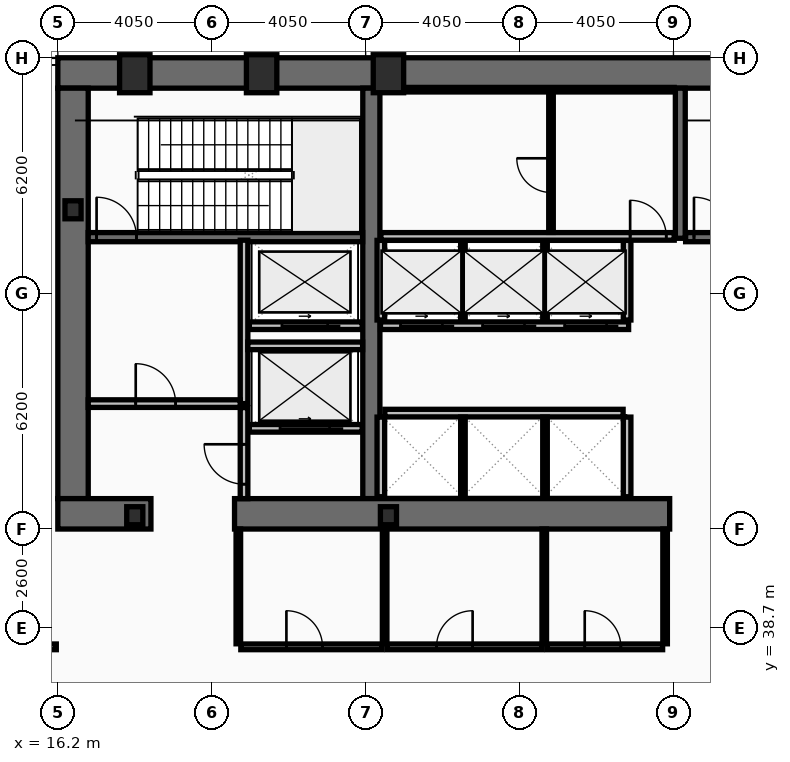
"""IFC4 building model, lengths in metres.
Left out: names, types, materials, properties, quantities, classifications, styles, units other than length and angle.
Written with IfcOpenShell. Run it as: python <this file> out.ifc"""

import sys

from ifc_helpers import new_model, si_unit, direction, frame, frame_2d, origin, origin_2d, place, context, subcontext, project, spatial, rectangle, hollow_rectangle, i_section, extrude, element, fill, save


model = new_model("IFC4")
c1 = context("Model", 3, precision=1e-05, world=origin(), true_north=direction((0.0, 1.0)))
c2 = subcontext(c1, "Body", "Model", "MODEL_VIEW")
j1 = project(units=[si_unit("LENGTHUNIT", "METRE"), si_unit("PLANEANGLEUNIT", "RADIAN")], contexts=[c1])
p1 = place(None, origin())
s1 = spatial("IfcSite", under=j1, at=p1, CompositionType="ELEMENT")
p2 = place(p1, origin())
s2 = spatial("IfcBuilding", under=s1, at=p2, CompositionType="ELEMENT")
p3 = place(p2, frame((0.0, 0.0, 5.4)))
s3 = spatial("IfcBuildingStorey", under=s2, at=p3, CompositionType="ELEMENT", Elevation=5.4)
p4 = place(p3, frame((16.2, 53.3, 0.0), z_axis=(0.0, 0.0, 1.0), x_axis=(1.0, 0.0, 0.0)))
e1 = element("IfcWall", 1, at=p4, inside=s3, PredefinedType="SHEAR", context=c2, shape_type="SweptSolid", body=[
    extrude(rectangle(XDim=40.5, YDim=0.8, at=frame_2d((20.25, 0.0))), origin(), (0.0, 0.0, 1.0), 4.8),
])
p5 = place(p3, frame((16.6, 42.1, 0.0), z_axis=(0.0, 0.0, 1.0), x_axis=(0.0, 1.0, 0.0)))
e2 = element("IfcWall", 2, at=p5, inside=s3, PredefinedType="SHEAR", context=c2, shape_type="SweptSolid", body=[
    extrude(rectangle(XDim=10.8, YDim=0.8, at=frame_2d((5.4, 0.0))), origin(), (0.0, 0.0, 1.0), 4.8),
])
p6 = place(p3, frame((24.45, 42.1, 0.0), z_axis=(0.0, 0.0, 1.0), x_axis=(0.0, 1.0, 0.0)))
e3 = element("IfcWall", 3, at=p6, inside=s3, PredefinedType="SHEAR", context=c2, shape_type="SweptSolid", body=[
    extrude(rectangle(XDim=10.8, YDim=0.45, at=frame_2d((5.4, 0.0))), origin(), (0.0, 0.0, 1.0), 4.8),
])
p7 = place(p3, frame((18.65, 41.7, 0.0), z_axis=(0.0, 0.0, 1.0), x_axis=(-1.0, 0.0, 0.0)))
e4 = element("IfcWall", 4, at=p7, inside=s3, PredefinedType="SHEAR", context=c2, shape_type="SweptSolid", body=[
    extrude(rectangle(XDim=2.45, YDim=0.8, at=frame_2d((1.225, 0.0))), origin(), (0.0, 0.0, 1.0), 4.8),
])
p8 = place(p3, frame((32.3, 41.7, 0.0), z_axis=(0.0, 0.0, 1.0), x_axis=(-1.0, 0.0, 0.0)))
e5 = element("IfcWall", 5, at=p8, inside=s3, PredefinedType="SHEAR", context=c2, shape_type="SweptSolid", body=[
    extrude(rectangle(XDim=11.45, YDim=0.8, at=frame_2d((5.725, 0.0))), origin(), (0.0, 0.0, 1.0), 4.8),
])
p9 = place(p3, frame((32.58, 48.95, 0.0), z_axis=(0.0, 0.0, 1.0), x_axis=(0.0, 1.0, 0.0)))
e6 = element("IfcWall", 6, at=p9, inside=s3, PredefinedType="SHEAR", context=c2, shape_type="SweptSolid", body=[
    extrude(rectangle(XDim=3.95, YDim=0.26, at=frame_2d((1.975, 0.0))), origin(), (0.0, 0.0, 1.0), 4.8),
])
p10 = place(p3, frame((17.0, 48.98, 0.0), z_axis=(0.0, 0.0, 1.0), x_axis=(1.0, 0.0, 0.0)))
e7 = element("IfcWall", 7, at=p10, inside=s3, PredefinedType="SHEAR", context=c2, shape_type="SweptSolid", body=[
    extrude(rectangle(XDim=7.22, YDim=0.24, at=frame_2d((3.61, 0.0))), origin(), (0.0, 0.0, 1.0), 4.8),
])
p11 = place(p10, frame((0.22, 0.0, 0.0)))
e8 = element("IfcOpeningElement", 8, at=p11, cuts=e7, PredefinedType="OPENING", context=c2, shape_type="SweptSolid", body=[
    extrude(rectangle(XDim=1.05, YDim=2.15, at=frame_2d((0.525, 1.075))), frame((0.0, 0.13, 0.0), z_axis=(0.0, -1.0, 0.0), x_axis=(1.0, 0.0, 0.0)), (0.0, 0.0, 1.0), 0.26),
])
p12 = place(p3, frame((32.72, 48.98, 0.0), z_axis=(0.0, 0.0, 1.0), x_axis=(1.0, 0.0, 0.0)))
e9 = element("IfcWall", 9, at=p12, inside=s3, PredefinedType="SHEAR", context=c2, shape_type="SweptSolid", body=[
    extrude(rectangle(XDim=7.56, YDim=0.24, at=frame_2d((3.78, 0.0))), origin(), (0.0, 0.0, 1.0), 4.8),
])
p13 = place(p12, frame((0.22, 0.0, 0.0)))
e10 = element("IfcOpeningElement", 10, at=p13, cuts=e9, PredefinedType="OPENING", context=c2, shape_type="SweptSolid", body=[
    extrude(rectangle(XDim=1.05, YDim=2.15, at=frame_2d((0.525, 1.075))), frame((0.0, 0.13, 0.0), z_axis=(0.0, -1.0, 0.0), x_axis=(1.0, 0.0, 0.0)), (0.0, 0.0, 1.0), 0.26),
])
for number, where, z_axis, x_axis in (
    (11, (18.225, 53.28, 0.0), (0.0, 0.0, 1.0), (1.0, 0.0, 0.0)),
    (12, (21.562, 53.28, 0.0), (0.0, 0.0, 1.0), (1.0, 0.0, 0.0)),
    (13, (24.9, 53.28, 0.0), (0.0, 0.0, 1.0), (1.0, 0.0, 0.0)),
):
    element("IfcColumn", number, at=place(p3, frame(where, z_axis=z_axis, x_axis=x_axis)), inside=s3, PredefinedType="COLUMN", context=c2, shape_type="SweptSolid", body=[
        extrude(hollow_rectangle(XDim=0.8, YDim=1.0, WallThickness=0.055, at=origin_2d()), origin(), (0.0, 0.0, 1.0), 5.0),
    ])
for number, where, z_axis, x_axis in (
    (14, (16.6, 49.7, 0.0), (0.0, 0.0, 1.0), (1.0, 0.0, 0.0)),
    (15, (18.225, 41.65, 0.0), (0.0, 0.0, 1.0), (1.0, 0.0, 0.0)),
    (16, (24.9, 41.65, 0.0), (0.0, 0.0, 1.0), (1.0, 0.0, 0.0)),
):
    element("IfcColumn", number, at=place(p3, frame(where, z_axis=z_axis, x_axis=x_axis)), inside=s3, PredefinedType="COLUMN", context=c2, shape_type="SweptSolid", body=[
        extrude(i_section(OverallWidth=0.424, OverallDepth=0.474, WebThickness=0.048, FlangeThickness=0.077, at=origin_2d()), origin(), (0.0, 0.0, 1.0), 5.0),
    ])
p14 = place(p3, frame((24.21, 43.95, 0.0), z_axis=(0.0, 0.0, 1.0), x_axis=(-1.0, 0.0, 0.0)))
e17 = element("IfcWall", 17, at=p14, inside=s3, PredefinedType="PARTITIONING", context=c2, shape_type="SweptSolid", body=[
    extrude(rectangle(XDim=2.97, YDim=0.2, at=frame_2d((1.485, 0.0))), origin(), (0.0, 0.0, 1.0), 4.8),
])
p15 = place(p14, frame((0.86, 0.0, 0.0)))
e18 = element("IfcOpeningElement", 18, at=p15, cuts=e17, PredefinedType="OPENING", context=c2, shape_type="SweptSolid", body=[
    extrude(rectangle(XDim=1.3, YDim=2.18, at=frame_2d((0.65, 1.09))), frame((0.0, 0.11, 0.0), z_axis=(0.0, -1.0, 0.0), x_axis=(1.0, 0.0, 0.0)), (0.0, 0.0, 1.0), 0.22),
])
p16 = place(p3, frame((24.21, 46.65, 0.0), z_axis=(0.0, 0.0, 1.0), x_axis=(-1.0, 0.0, 0.0)))
e19 = element("IfcWall", 19, at=p16, inside=s3, PredefinedType="PARTITIONING", context=c2, shape_type="SweptSolid", body=[
    extrude(rectangle(XDim=2.97, YDim=0.2, at=frame_2d((1.485, 0.0))), origin(), (0.0, 0.0, 1.0), 4.8),
])
p17 = place(p16, frame((0.91, 0.0, 0.0)))
e20 = element("IfcOpeningElement", 20, at=p17, cuts=e19, PredefinedType="OPENING", context=c2, shape_type="SweptSolid", body=[
    extrude(rectangle(XDim=1.2, YDim=2.18, at=frame_2d((0.6, 1.09))), frame((0.0, 0.11, 0.0), z_axis=(0.0, -1.0, 0.0), x_axis=(1.0, 0.0, 0.0)), (0.0, 0.0, 1.0), 0.22),
])
p18 = place(p3, frame((31.22, 46.65, 0.0), z_axis=(0.0, 0.0, 1.0), x_axis=(-1.0, 0.0, 0.0)))
e21 = element("IfcWall", 21, at=p18, inside=s3, PredefinedType="PARTITIONING", context=c2, shape_type="SweptSolid", body=[
    extrude(rectangle(XDim=6.53, YDim=0.2, at=frame_2d((3.265, 0.0))), origin(), (0.0, 0.0, 1.0), 4.8),
])
p19 = place(p18, frame((4.9, 0.0, 0.0)))
e22 = element("IfcOpeningElement", 22, at=p19, cuts=e21, PredefinedType="OPENING", context=c2, shape_type="SweptSolid", body=[
    extrude(rectangle(XDim=1.1, YDim=2.18, at=frame_2d((0.55, 1.09))), frame((0.0, 0.11, 0.0), z_axis=(0.0, -1.0, 0.0), x_axis=(1.0, 0.0, 0.0)), (0.0, 0.0, 1.0), 0.22),
])
p20 = place(p18, frame((2.74, 0.0, 0.0)))
e23 = element("IfcOpeningElement", 23, at=p20, cuts=e21, PredefinedType="OPENING", context=c2, shape_type="SweptSolid", body=[
    extrude(rectangle(XDim=1.1, YDim=2.18, at=frame_2d((0.55, 1.09))), frame((0.0, 0.11, 0.0), z_axis=(0.0, -1.0, 0.0), x_axis=(1.0, 0.0, 0.0)), (0.0, 0.0, 1.0), 0.22),
])
p21 = place(p18, frame((0.58, 0.0, 0.0)))
e24 = element("IfcOpeningElement", 24, at=p21, cuts=e21, PredefinedType="OPENING", context=c2, shape_type="SweptSolid", body=[
    extrude(rectangle(XDim=1.1, YDim=2.18, at=frame_2d((0.55, 1.09))), frame((0.0, 0.11, 0.0), z_axis=(0.0, -1.0, 0.0), x_axis=(1.0, 0.0, 0.0)), (0.0, 0.0, 1.0), 0.22),
])
p22 = place(p3, frame((21.1, 44.6, 0.0), z_axis=(0.0, 0.0, 1.0), x_axis=(0.0, 1.0, 0.0)))
e25 = element("IfcWall", 25, at=p22, inside=s3, PredefinedType="PARTITIONING", context=c2, shape_type="SweptSolid", body=[
    extrude(rectangle(XDim=4.3, YDim=0.2, at=frame_2d((2.15, 0.0))), origin(), (0.0, 0.0, 1.0), 4.8),
])
p23 = place(p3, frame((17.0, 44.6, 0.0), z_axis=(0.0, 0.0, 1.0), x_axis=(1.0, 0.0, 0.0)))
e26 = element("IfcWall", 26, at=p23, inside=s3, PredefinedType="PARTITIONING", context=c2, shape_type="SweptSolid", body=[
    extrude(rectangle(XDim=4.0, YDim=0.2, at=frame_2d((2.0, 0.0))), origin(), (0.0, 0.0, 1.0), 4.8),
])
p24 = place(p23, frame((1.25, 0.0, 0.0)))
e27 = element("IfcOpeningElement", 27, at=p24, cuts=e26, PredefinedType="OPENING", context=c2, shape_type="SweptSolid", body=[
    extrude(rectangle(XDim=1.05, YDim=2.15, at=frame_2d((0.525, 1.075))), frame((0.0, 0.11, 0.0), z_axis=(0.0, -1.0, 0.0), x_axis=(1.0, 0.0, 0.0)), (0.0, 0.0, 1.0), 0.22),
])
p25 = place(p3, frame((21.2, 46.12, 0.0), z_axis=(0.0, 0.0, 1.0), x_axis=(1.0, 0.0, 0.0)))
e28 = element("IfcWall", 28, at=p25, inside=s3, PredefinedType="PARTITIONING", context=c2, shape_type="SweptSolid", body=[
    extrude(rectangle(XDim=3.02, YDim=0.2, at=frame_2d((1.51, 0.0))), origin(), (0.0, 0.0, 1.0), 4.8),
])
p26 = place(p3, frame((21.1, 42.1, 0.0), z_axis=(0.0, 0.0, 1.0), x_axis=(0.0, 1.0, 0.0)))
e29 = element("IfcWall", 29, at=p26, inside=s3, PredefinedType="PARTITIONING", context=c2, shape_type="SweptSolid", body=[
    extrude(rectangle(XDim=2.395, YDim=0.2, at=frame_2d((1.198, 0.0))), origin(), (0.0, 0.0, 1.0), 4.8),
])
p27 = place(p26, frame((0.38, 0.0, 0.0)))
e30 = element("IfcOpeningElement", 30, at=p27, cuts=e29, PredefinedType="OPENING", context=c2, shape_type="SweptSolid", body=[
    extrude(rectangle(XDim=1.05, YDim=2.15, at=frame_2d((0.525, 1.075))), frame((0.0, 0.11, 0.0), z_axis=(0.0, -1.0, 0.0), x_axis=(1.0, 0.0, 0.0)), (0.0, 0.0, 1.0), 0.22),
])
for number, where, z_axis, x_axis in (
    (31, (24.7, 46.8, 0.0), (0.0, 0.0, 1.0), (0.0, 1.0, 0.0)),
    (32, (31.18, 46.8, 0.0), (0.0, 0.0, 1.0), (0.0, 1.0, 0.0)),
):
    element("IfcWall", number, at=place(p3, frame(where, z_axis=z_axis, x_axis=x_axis)), inside=s3, PredefinedType="PARTITIONING", context=c2, shape_type="SweptSolid", body=[
        extrude(rectangle(XDim=2.095, YDim=0.2, at=frame_2d((1.047, 0.0))), origin(), (0.0, 0.0, 1.0), 4.8),
    ])
for number, where, z_axis, x_axis in (
    (33, (26.86, 46.8, 0.0), (0.0, 0.0, 1.0), (0.0, 1.0, 0.0)),
    (34, (29.02, 46.8, 0.0), (0.0, 0.0, 1.0), (0.0, 1.0, 0.0)),
):
    element("IfcWall", number, at=place(p3, frame(where, z_axis=z_axis, x_axis=x_axis)), inside=s3, PredefinedType="PARTITIONING", context=c2, shape_type="SweptSolid", body=[
        extrude(rectangle(XDim=2.095, YDim=0.12, at=frame_2d((1.047, 0.0))), origin(), (0.0, 0.0, 1.0), 4.8),
    ])
p28 = place(p3, frame((24.805, 44.35, 0.0), z_axis=(0.0, 0.0, 1.0), x_axis=(1.0, 0.0, 0.0)))
e35 = element("IfcWall", 35, at=p28, inside=s3, PredefinedType="PARTITIONING", context=c2, shape_type="SweptSolid", body=[
    extrude(rectangle(XDim=6.27, YDim=0.2, at=frame_2d((3.135, 0.0))), origin(), (0.0, 0.0, 1.0), 4.8),
])
for number, where, z_axis, x_axis in (
    (36, (24.7, 42.15, 0.0), (0.0, 0.0, 1.0), (0.0, 1.0, 0.0)),
    (37, (31.18, 42.15, 0.0), (0.0, 0.0, 1.0), (0.0, 1.0, 0.0)),
):
    element("IfcWall", number, at=place(p3, frame(where, z_axis=z_axis, x_axis=x_axis)), inside=s3, PredefinedType="PARTITIONING", context=c2, shape_type="SweptSolid", body=[
        extrude(rectangle(XDim=2.095, YDim=0.2, at=frame_2d((1.048, 0.0))), origin(), (0.0, 0.0, 1.0), 4.8),
    ])
for number, where, z_axis, x_axis in (
    (38, (26.86, 42.15, 0.0), (0.0, 0.0, 1.0), (0.0, 1.0, 0.0)),
    (39, (29.02, 42.15, 0.0), (0.0, 0.0, 1.0), (0.0, 1.0, 0.0)),
):
    element("IfcWall", number, at=place(p3, frame(where, z_axis=z_axis, x_axis=x_axis)), inside=s3, PredefinedType="PARTITIONING", context=c2, shape_type="SweptSolid", body=[
        extrude(rectangle(XDim=2.095, YDim=0.12, at=frame_2d((1.048, 0.0))), origin(), (0.0, 0.0, 1.0), 4.8),
    ])
p29 = place(p3, frame((24.7, 52.86, 0.0), z_axis=(0.0, 0.0, 1.0), x_axis=(1.0, 0.0, 0.0)))
e40 = element("IfcWall", 40, at=p29, inside=s3, PredefinedType="PARTITIONING", context=c2, shape_type="SweptSolid", body=[
    extrude(rectangle(XDim=7.72, YDim=0.12, at=frame_2d((3.86, 0.0))), origin(), (0.0, 0.0, 1.0), 4.8),
])
p30 = place(p3, frame((24.7, 49.0, 0.0), z_axis=(0.0, 0.0, 1.0), x_axis=(1.0, 0.0, 0.0)))
e41 = element("IfcWall", 41, at=p30, inside=s3, PredefinedType="PARTITIONING", context=c2, shape_type="SweptSolid", body=[
    extrude(rectangle(XDim=7.72, YDim=0.2, at=frame_2d((3.86, 0.0))), origin(), (0.0, 0.0, 1.0), 4.8),
])
p31 = place(p30, frame((6.56, 0.0, 0.0)))
e42 = element("IfcOpeningElement", 42, at=p31, cuts=e41, PredefinedType="OPENING", context=c2, shape_type="SweptSolid", body=[
    extrude(rectangle(XDim=0.95, YDim=2.1, at=frame_2d((0.475, 1.05))), frame((0.0, 0.11, 0.0), z_axis=(0.0, -1.0, 0.0), x_axis=(1.0, 0.0, 0.0)), (0.0, 0.0, 1.0), 0.22),
])
p32 = place(p3, frame((29.177, 49.105, 0.0), z_axis=(0.0, 0.0, 1.0), x_axis=(0.0, 1.0, 0.0)))
e43 = element("IfcWall", 43, at=p32, inside=s3, PredefinedType="PARTITIONING", context=c2, shape_type="SweptSolid", body=[
    extrude(rectangle(XDim=3.69, YDim=0.12, at=frame_2d((1.845, 0.0))), origin(), (0.0, 0.0, 1.0), 4.8),
])
p33 = place(p32, frame((1.05, 0.0, 0.0)))
e44 = element("IfcOpeningElement", 44, at=p33, cuts=e43, PredefinedType="OPENING", context=c2, shape_type="SweptSolid", body=[
    extrude(rectangle(XDim=0.9, YDim=2.05, at=frame_2d((0.45, 1.025))), frame((0.0, 0.07, 0.0), z_axis=(0.0, -1.0, 0.0), x_axis=(1.0, 0.0, 0.0)), (0.0, 0.0, 1.0), 0.14),
])
p34 = place(p3, frame((21.015, 38.2, 0.0), z_axis=(0.0, 0.0, 1.0), x_axis=(1.0, 0.0, 0.0)))
e45 = element("IfcWall", 45, at=p34, inside=s3, PredefinedType="PARTITIONING", context=c2, shape_type="SweptSolid", body=[
    extrude(rectangle(XDim=3.72, YDim=0.15, at=frame_2d((1.86, 0.0))), origin(), (0.0, 0.0, 1.0), 3.89),
])
p35 = place(p34, frame((1.2, 0.0, 0.0)))
e46 = element("IfcOpeningElement", 46, at=p35, cuts=e45, PredefinedType="OPENING", context=c2, shape_type="SweptSolid", body=[
    extrude(rectangle(XDim=0.95, YDim=2.05, at=frame_2d((0.475, 1.025))), frame((0.0, 0.085, 0.0), z_axis=(0.0, -1.0, 0.0), x_axis=(1.0, 0.0, 0.0)), (0.0, 0.0, 1.0), 0.17),
])
p36 = place(p3, frame((24.865, 38.2, 0.0), z_axis=(0.0, 0.0, 1.0), x_axis=(1.0, 0.0, 0.0)))
e47 = element("IfcWall", 47, at=p36, inside=s3, PredefinedType="PARTITIONING", context=c2, shape_type="SweptSolid", body=[
    extrude(rectangle(XDim=4.07, YDim=0.15, at=frame_2d((2.035, 0.0))), origin(), (0.0, 0.0, 1.0), 3.89),
])
p37 = place(p36, frame((1.3, 0.0, 0.0)))
e48 = element("IfcOpeningElement", 48, at=p37, cuts=e47, PredefinedType="OPENING", context=c2, shape_type="SweptSolid", body=[
    extrude(rectangle(XDim=0.95, YDim=2.05, at=frame_2d((0.475, 1.025))), frame((0.0, 0.085, 0.0), z_axis=(0.0, -1.0, 0.0), x_axis=(1.0, 0.0, 0.0)), (0.0, 0.0, 1.0), 0.17),
])
p38 = place(p3, frame((29.065, 38.2, 0.0), z_axis=(0.0, 0.0, 1.0), x_axis=(1.0, 0.0, 0.0)))
e49 = element("IfcWall", 49, at=p38, inside=s3, PredefinedType="PARTITIONING", context=c2, shape_type="SweptSolid", body=[
    extrude(rectangle(XDim=3.05, YDim=0.15, at=frame_2d((1.525, 0.0))), origin(), (0.0, 0.0, 1.0), 3.89),
])
p39 = place(p38, frame((1.0, 0.0, 0.0)))
e50 = element("IfcOpeningElement", 50, at=p39, cuts=e49, PredefinedType="OPENING", context=c2, shape_type="SweptSolid", body=[
    extrude(rectangle(XDim=0.95, YDim=2.05, at=frame_2d((0.475, 1.025))), frame((0.0, 0.085, 0.0), z_axis=(0.0, -1.0, 0.0), x_axis=(1.0, 0.0, 0.0)), (0.0, 0.0, 1.0), 0.17),
])
p40 = place(p3, frame((20.95, 38.28, 0.0), z_axis=(0.0, 0.0, 1.0), x_axis=(0.0, 1.0, 0.0)))
e51 = element("IfcWall", 51, at=p40, inside=s3, PredefinedType="PARTITIONING", context=c2, shape_type="SweptSolid", body=[
    extrude(rectangle(XDim=3.02, YDim=0.12, at=frame_2d((1.51, 0.0))), origin(), (0.0, 0.0, 1.0), 4.8),
])
p41 = place(p3, frame((24.8, 38.28, 0.0), z_axis=(0.0, 0.0, 1.0), x_axis=(0.0, 1.0, 0.0)))
e52 = element("IfcWall", 52, at=p41, inside=s3, PredefinedType="PARTITIONING", context=c2, shape_type="SweptSolid", body=[
    extrude(rectangle(XDim=3.02, YDim=0.12, at=frame_2d((1.51, 0.0))), origin(), (0.0, 0.0, 1.0), 3.89),
])
for number, where, z_axis, x_axis in (
    (53, (29.0, 38.28, 0.0), (0.0, 0.0, 1.0), (0.0, 1.0, 0.0)),
    (54, (32.18, 38.28, 0.0), (0.0, 0.0, 1.0), (0.0, 1.0, 0.0)),
):
    element("IfcWall", number, at=place(p3, frame(where, z_axis=z_axis, x_axis=x_axis)), inside=s3, PredefinedType="PARTITIONING", context=c2, shape_type="SweptSolid", body=[
        extrude(rectangle(XDim=3.02, YDim=0.12, at=frame_2d((1.51, 0.0))), origin(), (0.0, 0.0, 1.0), 4.8),
    ])
p42 = place(p3, frame((0.18, 38.2, 0.0), z_axis=(0.0, 0.0, 1.0), x_axis=(1.0, 0.0, 0.0)))
e55 = element("IfcWall", 55, at=p42, inside=s3, PredefinedType="PARTITIONING", context=c2, shape_type="SweptSolid", body=[
    extrude(rectangle(XDim=15.98, YDim=0.15, at=frame_2d((7.99, 0.0))), origin(), (0.0, 0.0, 1.0), 4.14),
])
p43 = place(p42, frame((4.2, 0.0, 0.0)))
e56 = element("IfcOpeningElement", 56, at=p43, cuts=e55, PredefinedType="OPENING", context=c2, shape_type="SweptSolid", body=[
    extrude(rectangle(XDim=1.0, YDim=2.05, at=frame_2d((0.5, 1.025))), frame((0.0, 0.085, 0.0), z_axis=(0.0, -1.0, 0.0), x_axis=(1.0, 0.0, 0.0)), (0.0, 0.0, 1.0), 0.17),
])
p44 = place(p11, origin())
e57 = element("IfcDoor", 57, at=p44, inside=s3, OperationType="SINGLE_SWING_LEFT", PredefinedType="DOOR", context=c2, shape_type="SweptSolid", body=[
    extrude(rectangle(XDim=1.05, YDim=2.15, at=frame_2d((0.525, 1.075))), frame((0.0, 0.025, 0.0), z_axis=(0.0, -1.0, 0.0), x_axis=(1.0, 0.0, 0.0)), (0.0, 0.0, 1.0), 0.05),
])
fill(e8, e57)
p45 = place(p13, origin())
e58 = element("IfcDoor", 58, at=p45, inside=s3, OperationType="SINGLE_SWING_LEFT", PredefinedType="DOOR", context=c2, shape_type="SweptSolid", body=[
    extrude(rectangle(XDim=1.05, YDim=2.15, at=frame_2d((0.525, 1.075))), frame((0.0, 0.025, 0.0), z_axis=(0.0, -1.0, 0.0), x_axis=(1.0, 0.0, 0.0)), (0.0, 0.0, 1.0), 0.05),
])
fill(e10, e58)
p46 = place(p15, origin())
e59 = element("IfcDoor", 59, at=p46, inside=s3, OperationType="SLIDING_TO_LEFT", PredefinedType="DOOR", context=c2, shape_type="SweptSolid", body=[
    extrude(rectangle(XDim=1.3, YDim=2.18, at=frame_2d((0.65, 1.09))), frame((0.0, 0.025, 0.0), z_axis=(0.0, -1.0, 0.0), x_axis=(1.0, 0.0, 0.0)), (0.0, 0.0, 1.0), 0.05),
])
fill(e18, e59)
p47 = place(p17, origin())
e60 = element("IfcDoor", 60, at=p47, inside=s3, OperationType="SLIDING_TO_LEFT", PredefinedType="DOOR", context=c2, shape_type="SweptSolid", body=[
    extrude(rectangle(XDim=1.2, YDim=2.18, at=frame_2d((0.6, 1.09))), frame((0.0, 0.025, 0.0), z_axis=(0.0, -1.0, 0.0), x_axis=(1.0, 0.0, 0.0)), (0.0, 0.0, 1.0), 0.05),
])
fill(e20, e60)
p48 = place(p19, origin())
e61 = element("IfcDoor", 61, at=p48, inside=s3, OperationType="SLIDING_TO_LEFT", PredefinedType="DOOR", context=c2, shape_type="SweptSolid", body=[
    extrude(rectangle(XDim=1.1, YDim=2.18, at=frame_2d((0.55, 1.09))), frame((0.0, 0.025, 0.0), z_axis=(0.0, -1.0, 0.0), x_axis=(1.0, 0.0, 0.0)), (0.0, 0.0, 1.0), 0.05),
])
fill(e22, e61)
p49 = place(p20, origin())
e62 = element("IfcDoor", 62, at=p49, inside=s3, OperationType="SLIDING_TO_LEFT", PredefinedType="DOOR", context=c2, shape_type="SweptSolid", body=[
    extrude(rectangle(XDim=1.1, YDim=2.18, at=frame_2d((0.55, 1.09))), frame((0.0, 0.025, 0.0), z_axis=(0.0, -1.0, 0.0), x_axis=(1.0, 0.0, 0.0)), (0.0, 0.0, 1.0), 0.05),
])
fill(e23, e62)
p50 = place(p21, origin())
e63 = element("IfcDoor", 63, at=p50, inside=s3, OperationType="SLIDING_TO_LEFT", PredefinedType="DOOR", context=c2, shape_type="SweptSolid", body=[
    extrude(rectangle(XDim=1.1, YDim=2.18, at=frame_2d((0.55, 1.09))), frame((0.0, 0.025, 0.0), z_axis=(0.0, -1.0, 0.0), x_axis=(1.0, 0.0, 0.0)), (0.0, 0.0, 1.0), 0.05),
])
fill(e24, e63)
p51 = place(p24, origin())
e64 = element("IfcDoor", 64, at=p51, inside=s3, OperationType="SINGLE_SWING_LEFT", PredefinedType="DOOR", context=c2, shape_type="SweptSolid", body=[
    extrude(rectangle(XDim=1.05, YDim=2.15, at=frame_2d((0.525, 1.075))), frame((0.0, 0.025, 0.0), z_axis=(0.0, -1.0, 0.0), x_axis=(1.0, 0.0, 0.0)), (0.0, 0.0, 1.0), 0.05),
])
fill(e27, e64)
p52 = place(p27, origin())
e65 = element("IfcDoor", 65, at=p52, inside=s3, OperationType="SINGLE_SWING_RIGHT", PredefinedType="DOOR", context=c2, shape_type="SweptSolid", body=[
    extrude(rectangle(XDim=1.05, YDim=2.15, at=frame_2d((0.525, 1.075))), frame((0.0, 0.025, 0.0), z_axis=(0.0, -1.0, 0.0), x_axis=(1.0, 0.0, 0.0)), (0.0, 0.0, 1.0), 0.05),
])
fill(e30, e65)
p53 = place(p31, origin())
e66 = element("IfcDoor", 66, at=p53, inside=s3, OperationType="SINGLE_SWING_LEFT", PredefinedType="DOOR", context=c2, shape_type="SweptSolid", body=[
    extrude(rectangle(XDim=0.95, YDim=2.1, at=frame_2d((0.475, 1.05))), frame((0.0, 0.025, 0.0), z_axis=(0.0, -1.0, 0.0), x_axis=(1.0, 0.0, 0.0)), (0.0, 0.0, 1.0), 0.05),
])
fill(e42, e66)
p54 = place(p33, origin())
e67 = element("IfcDoor", 67, at=p54, inside=s3, OperationType="SINGLE_SWING_RIGHT", PredefinedType="DOOR", context=c2, shape_type="SweptSolid", body=[
    extrude(rectangle(XDim=0.9, YDim=2.05, at=frame_2d((0.45, 1.025))), frame((0.0, 0.025, 0.0), z_axis=(0.0, -1.0, 0.0), x_axis=(1.0, 0.0, 0.0)), (0.0, 0.0, 1.0), 0.05),
])
fill(e44, e67)
p55 = place(p35, origin())
e68 = element("IfcDoor", 68, at=p55, inside=s3, OperationType="SINGLE_SWING_LEFT", PredefinedType="DOOR", context=c2, shape_type="SweptSolid", body=[
    extrude(rectangle(XDim=0.95, YDim=2.05, at=frame_2d((0.475, 1.025))), frame((0.0, 0.025, 0.0), z_axis=(0.0, -1.0, 0.0), x_axis=(1.0, 0.0, 0.0)), (0.0, 0.0, 1.0), 0.05),
])
fill(e46, e68)
p56 = place(p37, origin())
e69 = element("IfcDoor", 69, at=p56, inside=s3, OperationType="SINGLE_SWING_RIGHT", PredefinedType="DOOR", context=c2, shape_type="SweptSolid", body=[
    extrude(rectangle(XDim=0.95, YDim=2.05, at=frame_2d((0.475, 1.025))), frame((0.0, 0.025, 0.0), z_axis=(0.0, -1.0, 0.0), x_axis=(1.0, 0.0, 0.0)), (0.0, 0.0, 1.0), 0.05),
])
fill(e48, e69)
p57 = place(p39, origin())
e70 = element("IfcDoor", 70, at=p57, inside=s3, OperationType="SINGLE_SWING_LEFT", PredefinedType="DOOR", context=c2, shape_type="SweptSolid", body=[
    extrude(rectangle(XDim=0.95, YDim=2.05, at=frame_2d((0.475, 1.025))), frame((0.0, 0.025, 0.0), z_axis=(0.0, -1.0, 0.0), x_axis=(1.0, 0.0, 0.0)), (0.0, 0.0, 1.0), 0.05),
])
fill(e50, e70)
save(model, sys.argv[1])
